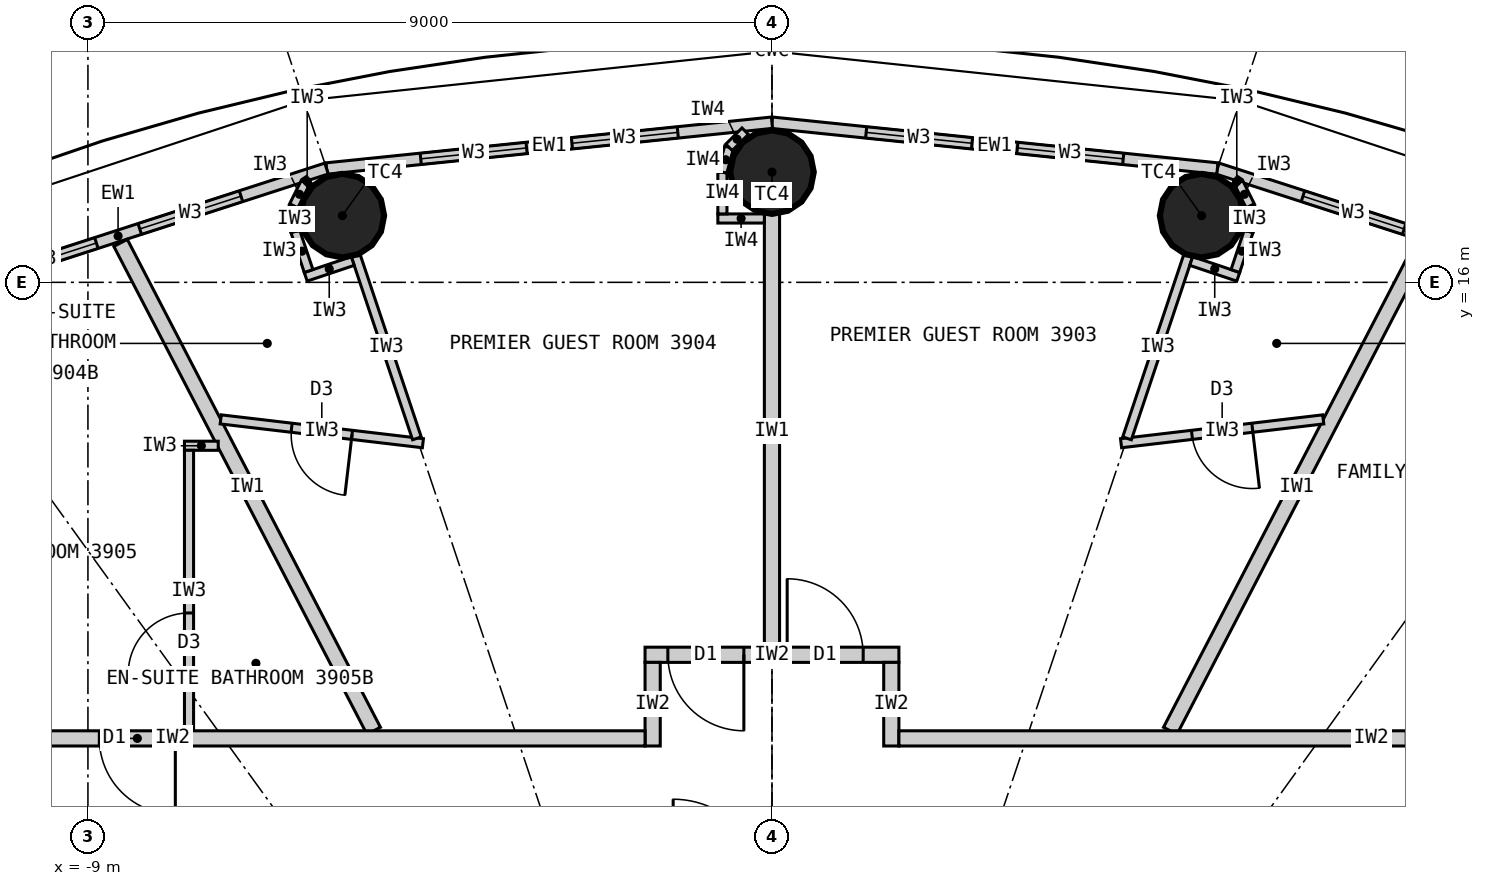
"""IFC4 building model, lengths in metres.
Left out: names, types, materials, properties, quantities, classifications, styles, units other than length and angle.
Written with IfcOpenShell. Run it as: python <this file> out.ifc"""

import sys

from ifc_helpers import new_model, si_unit, direction, frame, frame_2d, origin, origin_2d, place, context, subcontext, project, spatial, rectangle, circle, extrude, element, fill, save


model = new_model("IFC4")
c1 = context("Model", 3, precision=1e-05, world=origin(), true_north=direction((0.0, 1.0)))
c2 = subcontext(c1, "Body", "Model", "MODEL_VIEW")
j1 = project(units=[si_unit("LENGTHUNIT", "METRE"), si_unit("PLANEANGLEUNIT", "RADIAN")], contexts=[c1])
p1 = place(None, origin())
s1 = spatial("IfcSite", under=j1, at=p1, CompositionType="ELEMENT")
p2 = place(p1, origin())
s2 = spatial("IfcBuilding", under=s1, at=p2, CompositionType="ELEMENT")
p3 = place(p2, frame((0.0, 0.0, 150.0)))
s3 = spatial("IfcBuildingStorey", under=s2, at=p3, CompositionType="ELEMENT", Elevation=150.0)
for number, where, z_axis, x_axis in (
    (1, (5.653, 16.877, 0.0), (0.0, 0.0, 1.0), (1.0, 0.0, 0.0)),
    (2, (0.0, 17.45, 0.0), (0.0, 0.0, 1.0), (1.0, 0.0, 0.0)),
    (3, (-5.653, 16.877, 0.0), (0.0, 0.0, 1.0), (1.0, 0.0, 0.0)),
):
    element("IfcColumn", number, at=place(p3, frame(where, z_axis=z_axis, x_axis=x_axis)), inside=s3, PredefinedType="COLUMN", context=c2, shape_type="SweptSolid", body=[
        extrude(circle(Radius=0.55, at=origin_2d()), origin(), (0.0, 0.0, 1.0), 3.3),
    ])
p4 = place(p3, frame((11.346, 15.722, 0.0), z_axis=(0.0, 0.0, 1.0), x_axis=(-0.951432482129, 0.307857486429, 0.0)))
e4 = element("IfcWall", 4, at=p4, inside=s3, PredefinedType="ELEMENTEDWALL", context=c2, shape_type="SweptSolid", body=[
    extrude(rectangle(XDim=5.766, YDim=0.15, at=frame_2d((2.883, 0.0))), origin(), (0.0, 0.0, 1.0), 3.12),
])
p5 = place(p4, frame((1.183, 0.0, 0.9)))
e5 = element("IfcOpeningElement", 5, at=p5, cuts=e4, PredefinedType="OPENING", context=c2, shape_type="SweptSolid", body=[
    extrude(rectangle(XDim=1.4, YDim=1.9, at=frame_2d((0.7, 0.95))), frame((0.0, 0.085, 0.0), z_axis=(0.0, -1.0, 0.0), x_axis=(1.0, 0.0, 0.0)), (0.0, 0.0, 1.0), 0.17),
])
p6 = place(p4, frame((3.183, 0.0, 0.9)))
e6 = element("IfcOpeningElement", 6, at=p6, cuts=e4, PredefinedType="OPENING", context=c2, shape_type="SweptSolid", body=[
    extrude(rectangle(XDim=1.4, YDim=1.9, at=frame_2d((0.7, 0.95))), frame((0.0, 0.085, 0.0), z_axis=(0.0, -1.0, 0.0), x_axis=(1.0, 0.0, 0.0)), (0.0, 0.0, 1.0), 0.17),
])
p7 = place(p3, frame((5.86, 17.497, 0.0), z_axis=(0.0, 0.0, 1.0), x_axis=(-0.994751738032, 0.102318032045, 0.0)))
e7 = element("IfcWall", 7, at=p7, inside=s3, PredefinedType="ELEMENTEDWALL", context=c2, shape_type="SweptSolid", body=[
    extrude(rectangle(XDim=5.891, YDim=0.15, at=frame_2d((2.946, 0.0))), origin(), (0.0, 0.0, 1.0), 3.12),
])
p8 = place(p7, frame((1.246, 0.0, 0.9)))
e8 = element("IfcOpeningElement", 8, at=p8, cuts=e7, PredefinedType="OPENING", context=c2, shape_type="SweptSolid", body=[
    extrude(rectangle(XDim=1.4, YDim=1.9, at=frame_2d((0.7, 0.95))), frame((0.0, 0.085, 0.0), z_axis=(0.0, -1.0, 0.0), x_axis=(1.0, 0.0, 0.0)), (0.0, 0.0, 1.0), 0.17),
])
p9 = place(p7, frame((3.246, 0.0, 0.9)))
e9 = element("IfcOpeningElement", 9, at=p9, cuts=e7, PredefinedType="OPENING", context=c2, shape_type="SweptSolid", body=[
    extrude(rectangle(XDim=1.4, YDim=1.9, at=frame_2d((0.7, 0.95))), frame((0.0, 0.085, 0.0), z_axis=(0.0, -1.0, 0.0), x_axis=(1.0, 0.0, 0.0)), (0.0, 0.0, 1.0), 0.17),
])
p10 = place(p3, frame((0.0, 18.1, 0.0), z_axis=(0.0, 0.0, 1.0), x_axis=(-0.994751738032, -0.102318032045, 0.0)))
e10 = element("IfcWall", 10, at=p10, inside=s3, PredefinedType="ELEMENTEDWALL", context=c2, shape_type="SweptSolid", body=[
    extrude(rectangle(XDim=5.891, YDim=0.15, at=frame_2d((2.946, 0.0))), origin(), (0.0, 0.0, 1.0), 3.12),
])
p11 = place(p10, frame((1.246, 0.0, 0.9)))
e11 = element("IfcOpeningElement", 11, at=p11, cuts=e10, PredefinedType="OPENING", context=c2, shape_type="SweptSolid", body=[
    extrude(rectangle(XDim=1.4, YDim=1.9, at=frame_2d((0.7, 0.95))), frame((0.0, 0.085, 0.0), z_axis=(0.0, -1.0, 0.0), x_axis=(1.0, 0.0, 0.0)), (0.0, 0.0, 1.0), 0.17),
])
p12 = place(p10, frame((3.246, 0.0, 0.9)))
e12 = element("IfcOpeningElement", 12, at=p12, cuts=e10, PredefinedType="OPENING", context=c2, shape_type="SweptSolid", body=[
    extrude(rectangle(XDim=1.4, YDim=1.9, at=frame_2d((0.7, 0.95))), frame((0.0, 0.085, 0.0), z_axis=(0.0, -1.0, 0.0), x_axis=(1.0, 0.0, 0.0)), (0.0, 0.0, 1.0), 0.17),
])
p13 = place(p3, frame((-5.86, 17.497, 0.0), z_axis=(0.0, 0.0, 1.0), x_axis=(-0.951432482129, -0.307857486429, 0.0)))
e13 = element("IfcWall", 13, at=p13, inside=s3, PredefinedType="ELEMENTEDWALL", context=c2, shape_type="SweptSolid", body=[
    extrude(rectangle(XDim=5.766, YDim=0.15, at=frame_2d((2.883, 0.0))), origin(), (0.0, 0.0, 1.0), 3.12),
])
p14 = place(p13, frame((1.183, 0.0, 0.9)))
e14 = element("IfcOpeningElement", 14, at=p14, cuts=e13, PredefinedType="OPENING", context=c2, shape_type="SweptSolid", body=[
    extrude(rectangle(XDim=1.4, YDim=1.9, at=frame_2d((0.7, 0.95))), frame((0.0, 0.085, 0.0), z_axis=(0.0, -1.0, 0.0), x_axis=(1.0, 0.0, 0.0)), (0.0, 0.0, 1.0), 0.17),
])
p15 = place(p13, frame((3.183, 0.0, 0.9)))
e15 = element("IfcOpeningElement", 15, at=p15, cuts=e13, PredefinedType="OPENING", context=c2, shape_type="SweptSolid", body=[
    extrude(rectangle(XDim=1.4, YDim=1.9, at=frame_2d((0.7, 0.95))), frame((0.0, 0.085, 0.0), z_axis=(0.0, -1.0, 0.0), x_axis=(1.0, 0.0, 0.0)), (0.0, 0.0, 1.0), 0.17),
])
p16 = place(p3, frame((5.24, 10.1, 0.0), z_axis=(0.0, 0.0, 1.0), x_axis=(0.460532965373, 0.887642601391, 0.0)))
e16 = element("IfcWall", 16, at=p16, inside=s3, PredefinedType="PARTITIONING", context=c2, shape_type="SweptSolid", body=[
    extrude(rectangle(XDim=7.231, YDim=0.2, at=frame_2d((3.616, 0.0))), origin(), (0.0, 0.0, 1.0), 3.12),
])
p17 = place(p3, frame((0.0, 11.2, 0.0), z_axis=(0.0, 0.0, 1.0), x_axis=(0.0, 1.0, 0.0)))
e17 = element("IfcWall", 17, at=p17, inside=s3, PredefinedType="PARTITIONING", context=c2, shape_type="SweptSolid", body=[
    extrude(rectangle(XDim=5.7, YDim=0.2, at=frame_2d((2.85, 0.0))), origin(), (0.0, 0.0, 1.0), 2.42),
])
p18 = place(p3, frame((-5.24, 10.1, 0.0), z_axis=(0.0, 0.0, 1.0), x_axis=(-0.460532965373, 0.887642601391, 0.0)))
e18 = element("IfcWall", 18, at=p18, inside=s3, PredefinedType="PARTITIONING", context=c2, shape_type="SweptSolid", body=[
    extrude(rectangle(XDim=7.231, YDim=0.2, at=frame_2d((3.616, 0.0))), origin(), (0.0, 0.0, 1.0), 3.12),
])
p19 = place(p3, frame((-1.67, 11.1, 0.0), z_axis=(0.0, 0.0, 1.0), x_axis=(1.0, 0.0, 0.0)))
e19 = element("IfcWall", 19, at=p19, inside=s3, PredefinedType="PARTITIONING", context=c2, shape_type="SweptSolid", body=[
    extrude(rectangle(XDim=3.34, YDim=0.2, at=frame_2d((1.67, 0.0))), origin(), (0.0, 0.0, 1.0), 3.12),
])
p20 = place(p19, frame((1.87, 0.0, 0.0)))
e20 = element("IfcOpeningElement", 20, at=p20, cuts=e19, PredefinedType="OPENING", context=c2, shape_type="SweptSolid", body=[
    extrude(rectangle(XDim=1.0, YDim=2.2, at=frame_2d((0.5, 1.1))), frame((0.0, 0.11, 0.0), z_axis=(0.0, -1.0, 0.0), x_axis=(1.0, 0.0, 0.0)), (0.0, 0.0, 1.0), 0.22),
])
p21 = place(p19, frame((0.3, 0.0, 0.0)))
e21 = element("IfcOpeningElement", 21, at=p21, cuts=e19, PredefinedType="OPENING", context=c2, shape_type="SweptSolid", body=[
    extrude(rectangle(XDim=1.0, YDim=2.2, at=frame_2d((0.5, 1.1))), frame((0.0, 0.11, 0.0), z_axis=(0.0, -1.0, 0.0), x_axis=(1.0, 0.0, 0.0)), (0.0, 0.0, 1.0), 0.22),
])
for number, where, z_axis, x_axis in (
    (22, (-1.57, 9.9, 0.0), (0.0, 0.0, 1.0), (0.0, 1.0, 0.0)),
    (23, (1.57, 9.9, 0.0), (0.0, 0.0, 1.0), (0.0, 1.0, 0.0)),
):
    element("IfcWall", number, at=place(p3, frame(where, z_axis=z_axis, x_axis=x_axis)), inside=s3, PredefinedType="PARTITIONING", context=c2, shape_type="SweptSolid", body=[
        extrude(rectangle(XDim=1.1, YDim=0.2, at=frame_2d((0.55, 0.0))), origin(), (0.0, 0.0, 1.0), 3.12),
    ])
p22 = place(p3, frame((7.253, 14.197, 0.0), z_axis=(0.0, 0.0, 1.0), x_axis=(-0.993128188393, -0.117031625725, 0.0)))
e24 = element("IfcWall", 24, at=p22, inside=s3, PredefinedType="PARTITIONING", context=c2, shape_type="SweptSolid", body=[
    extrude(rectangle(XDim=2.678, YDim=0.12, at=frame_2d((1.339, 0.0))), origin(), (0.0, 0.0, 1.0), 3.12),
])
p23 = place(p22, frame((0.939, 0.0, 0.0)))
e25 = element("IfcOpeningElement", 25, at=p23, cuts=e24, PredefinedType="OPENING", context=c2, shape_type="SweptSolid", body=[
    extrude(rectangle(XDim=0.8, YDim=2.1, at=frame_2d((0.4, 1.05))), frame((0.0, 0.07, 0.0), z_axis=(0.0, -1.0, 0.0), x_axis=(1.0, 0.0, 0.0)), (0.0, 0.0, 1.0), 0.14),
])
p24 = place(p3, frame((4.671, 13.948, 0.0), z_axis=(0.0, 0.0, 1.0), x_axis=(0.317669167093, 0.948201613729, 0.0)))
e26 = element("IfcWall", 26, at=p24, inside=s3, PredefinedType="PARTITIONING", context=c2, shape_type="SweptSolid", body=[
    extrude(rectangle(XDim=2.54, YDim=0.12, at=frame_2d((1.27, 0.0))), origin(), (0.0, 0.0, 1.0), 2.42),
])
p25 = place(p3, frame((5.516, 16.28, 0.0), z_axis=(0.0, 0.0, 1.0), x_axis=(0.948157944392, -0.317799484717, 0.0)))
e27 = element("IfcWall", 27, at=p25, inside=s3, PredefinedType="PARTITIONING", context=c2, shape_type="SweptSolid", body=[
    extrude(rectangle(XDim=0.652, YDim=0.12, at=frame_2d((0.326, 0.0))), origin(), (0.0, 0.0, 1.0), 3.12),
])
p26 = place(p3, frame((6.097, 16.149, 0.0), z_axis=(0.0, 0.0, 1.0), x_axis=(0.317292604854, 0.948327687514, 0.0)))
e28 = element("IfcWall", 28, at=p26, inside=s3, PredefinedType="PARTITIONING", context=c2, shape_type="SweptSolid", body=[
    extrude(rectangle(XDim=0.55, YDim=0.12, at=frame_2d((0.275, 0.0))), origin(), (0.0, 0.0, 1.0), 3.12),
])
for number, where, z_axis, x_axis in (
    (29, (6.271, 16.67, 0.0), (0.0, 0.0, 1.0), (0.061, 0.998, 0.0)),
    (30, (6.292, 17.007, 0.0), (0.0, 0.0, 1.0), (-0.445, 0.895, 0.0)),
):
    element("IfcWall", number, at=place(p3, frame(where, z_axis=z_axis, x_axis=x_axis)), inside=s3, PredefinedType="PARTITIONING", context=c2, shape_type="SweptSolid", body=[
        extrude(rectangle(XDim=0.338, YDim=0.12, at=frame_2d((0.169, 0.0))), origin(), (0.0, 0.0, 1.0), 3.12),
    ])
p27 = place(p3, frame((6.142, 17.31, 0.0), z_axis=(0.0, 0.0, 1.0), x_axis=(-0.835039693181, 0.550189704386, 0.0)))
e31 = element("IfcWall", 31, at=p27, inside=s3, PredefinedType="PARTITIONING", context=c2, shape_type="SweptSolid", body=[
    extrude(rectangle(XDim=0.062, YDim=0.12, at=frame_2d((0.031, 0.0))), origin(), (0.0, 0.0, 1.0), 3.12),
])
p28 = place(p3, frame((-7.253, 14.197, 0.0), z_axis=(0.0, 0.0, 1.0), x_axis=(0.993128188393, -0.117031625725, 0.0)))
e32 = element("IfcWall", 32, at=p28, inside=s3, PredefinedType="PARTITIONING", context=c2, shape_type="SweptSolid", body=[
    extrude(rectangle(XDim=2.678, YDim=0.12, at=frame_2d((1.339, 0.0))), origin(), (0.0, 0.0, 1.0), 3.12),
])
p29 = place(p28, frame((0.939, 0.0, 0.0)))
e33 = element("IfcOpeningElement", 33, at=p29, cuts=e32, PredefinedType="OPENING", context=c2, shape_type="SweptSolid", body=[
    extrude(rectangle(XDim=0.8, YDim=2.1, at=frame_2d((0.4, 1.05))), frame((0.0, 0.07, 0.0), z_axis=(0.0, -1.0, 0.0), x_axis=(1.0, 0.0, 0.0)), (0.0, 0.0, 1.0), 0.14),
])
p30 = place(p3, frame((-4.671, 13.948, 0.0), z_axis=(0.0, 0.0, 1.0), x_axis=(-0.317669167093, 0.948201613729, 0.0)))
e34 = element("IfcWall", 34, at=p30, inside=s3, PredefinedType="PARTITIONING", context=c2, shape_type="SweptSolid", body=[
    extrude(rectangle(XDim=2.54, YDim=0.12, at=frame_2d((1.27, 0.0))), origin(), (0.0, 0.0, 1.0), 2.42),
])
p31 = place(p3, frame((-5.516, 16.28, 0.0), z_axis=(0.0, 0.0, 1.0), x_axis=(-0.948157944392, -0.317799484717, 0.0)))
e35 = element("IfcWall", 35, at=p31, inside=s3, PredefinedType="PARTITIONING", context=c2, shape_type="SweptSolid", body=[
    extrude(rectangle(XDim=0.652, YDim=0.12, at=frame_2d((0.326, 0.0))), origin(), (0.0, 0.0, 1.0), 3.12),
])
p32 = place(p3, frame((-6.097, 16.149, 0.0), z_axis=(0.0, 0.0, 1.0), x_axis=(-0.317292604854, 0.948327687514, 0.0)))
e36 = element("IfcWall", 36, at=p32, inside=s3, PredefinedType="PARTITIONING", context=c2, shape_type="SweptSolid", body=[
    extrude(rectangle(XDim=0.55, YDim=0.12, at=frame_2d((0.275, 0.0))), origin(), (0.0, 0.0, 1.0), 3.12),
])
for number, where, z_axis, x_axis in (
    (37, (-6.271, 16.67, 0.0), (0.0, 0.0, 1.0), (-0.061, 0.998, 0.0)),
    (38, (-6.292, 17.007, 0.0), (0.0, 0.0, 1.0), (0.445, 0.895, 0.0)),
):
    element("IfcWall", number, at=place(p3, frame(where, z_axis=z_axis, x_axis=x_axis)), inside=s3, PredefinedType="PARTITIONING", context=c2, shape_type="SweptSolid", body=[
        extrude(rectangle(XDim=0.338, YDim=0.12, at=frame_2d((0.169, 0.0))), origin(), (0.0, 0.0, 1.0), 3.12),
    ])
p33 = place(p3, frame((-6.142, 17.31, 0.0), z_axis=(0.0, 0.0, 1.0), x_axis=(0.835039693181, 0.550189704386, 0.0)))
e39 = element("IfcWall", 39, at=p33, inside=s3, PredefinedType="PARTITIONING", context=c2, shape_type="SweptSolid", body=[
    extrude(rectangle(XDim=0.062, YDim=0.12, at=frame_2d((0.031, 0.0))), origin(), (0.0, 0.0, 1.0), 3.12),
])
p34 = place(p3, frame((-7.286, 13.85, 0.0), z_axis=(0.0, 0.0, 1.0), x_axis=(-1.0, 0.0, 0.0)))
e40 = element("IfcWall", 40, at=p34, inside=s3, PredefinedType="PARTITIONING", context=c2, shape_type="SweptSolid", body=[
    extrude(rectangle(XDim=0.444, YDim=0.12, at=frame_2d((0.222, 0.0))), origin(), (0.0, 0.0, 1.0), 3.12),
])
p35 = place(p3, frame((-7.67, 10.1, 0.0), z_axis=(0.0, 0.0, 1.0), x_axis=(0.0, 1.0, 0.0)))
e41 = element("IfcWall", 41, at=p35, inside=s3, PredefinedType="PARTITIONING", context=c2, shape_type="SweptSolid", body=[
    extrude(rectangle(XDim=3.69, YDim=0.12, at=frame_2d((1.845, 0.0))), origin(), (0.0, 0.0, 1.0), 3.12),
])
p36 = place(p35, frame((0.75, 0.0, 0.0)))
e42 = element("IfcOpeningElement", 42, at=p36, cuts=e41, PredefinedType="OPENING", context=c2, shape_type="SweptSolid", body=[
    extrude(rectangle(XDim=0.8, YDim=2.1, at=frame_2d((0.4, 1.05))), frame((0.0, 0.07, 0.0), z_axis=(0.0, -1.0, 0.0), x_axis=(1.0, 0.0, 0.0)), (0.0, 0.0, 1.0), 0.14),
])
p37 = place(p3, frame((-14.1, 10.0, 0.0), z_axis=(0.0, 0.0, 1.0), x_axis=(1.0, 0.0, 0.0)))
e43 = element("IfcWall", 43, at=p37, inside=s3, PredefinedType="PARTITIONING", context=c2, shape_type="SweptSolid", body=[
    extrude(rectangle(XDim=12.43, YDim=0.2, at=frame_2d((6.215, 0.0))), origin(), (0.0, 0.0, 1.0), 3.12),
])
p38 = place(p37, frame((5.25, 0.0, 0.0)))
e44 = element("IfcOpeningElement", 44, at=p38, cuts=e43, PredefinedType="OPENING", context=c2, shape_type="SweptSolid", body=[
    extrude(rectangle(XDim=1.0, YDim=2.2, at=frame_2d((0.5, 1.1))), frame((0.0, 0.11, 0.0), z_axis=(0.0, -1.0, 0.0), x_axis=(1.0, 0.0, 0.0)), (0.0, 0.0, 1.0), 0.22),
])
p39 = place(p3, frame((1.67, 10.0, 0.0), z_axis=(0.0, 0.0, 1.0), x_axis=(1.0, 0.0, 0.0)))
e45 = element("IfcWall", 45, at=p39, inside=s3, PredefinedType="PARTITIONING", context=c2, shape_type="SweptSolid", body=[
    extrude(rectangle(XDim=12.43, YDim=0.2, at=frame_2d((6.215, 0.0))), origin(), (0.0, 0.0, 1.0), 3.12),
])
p40 = place(p39, frame((6.675, 0.0, 0.0)))
e46 = element("IfcOpeningElement", 46, at=p40, cuts=e45, PredefinedType="OPENING", context=c2, shape_type="SweptSolid", body=[
    extrude(rectangle(XDim=1.0, YDim=2.2, at=frame_2d((0.5, 1.1))), frame((0.0, 0.11, 0.0), z_axis=(0.0, -1.0, 0.0), x_axis=(1.0, 0.0, 0.0)), (0.0, 0.0, 1.0), 0.22),
])
p41 = place(p3, frame((-0.1, 16.84, 0.0), z_axis=(0.0, 0.0, 1.0), x_axis=(-1.0, 0.0, 0.0)))
e47 = element("IfcWall", 47, at=p41, inside=s3, PredefinedType="PARTITIONING", context=c2, shape_type="SweptSolid", body=[
    extrude(rectangle(XDim=0.612, YDim=0.12, at=frame_2d((0.306, 0.0))), origin(), (0.0, 0.0, 1.0), 3.12),
])
p42 = place(p3, frame((-0.652, 16.9, 0.0), z_axis=(0.0, 0.0, 1.0), x_axis=(0.0, 1.0, 0.0)))
e48 = element("IfcWall", 48, at=p42, inside=s3, PredefinedType="PARTITIONING", context=c2, shape_type="SweptSolid", body=[
    extrude(rectangle(XDim=0.55, YDim=0.12, at=frame_2d((0.275, 0.0))), origin(), (0.0, 0.0, 1.0), 3.12),
])
p43 = place(p3, frame((-0.652, 17.45, 0.0), z_axis=(0.0, 0.0, 1.0), x_axis=(0.258832454679, 0.965922233104, 0.0)))
e49 = element("IfcWall", 49, at=p43, inside=s3, PredefinedType="PARTITIONING", context=c2, shape_type="SweptSolid", body=[
    extrude(rectangle(XDim=0.338, YDim=0.12, at=frame_2d((0.169, 0.0))), origin(), (0.0, 0.0, 1.0), 3.12),
])
p44 = place(p3, frame((-0.565, 17.776, 0.0), z_axis=(0.0, 0.0, 1.0), x_axis=(0.707106781187, 0.707106781187, 0.0)))
e50 = element("IfcWall", 50, at=p44, inside=s3, PredefinedType="PARTITIONING", context=c2, shape_type="SweptSolid", body=[
    extrude(rectangle(XDim=0.301, YDim=0.12, at=frame_2d((0.15, 0.0))), origin(), (0.0, 0.0, 1.0), 3.12),
])
p45 = place(p6, origin())
e51 = element("IfcWindow", 51, at=p45, inside=s3, PartitioningType="SINGLE_PANEL", PredefinedType="WINDOW", context=c2, shape_type="SweptSolid", body=[
    extrude(rectangle(XDim=1.4, YDim=1.9, at=frame_2d((0.7, 0.95))), frame((0.0, 0.03, 0.0), z_axis=(0.0, -1.0, 0.0), x_axis=(1.0, 0.0, 0.0)), (0.0, 0.0, 1.0), 0.06),
])
fill(e6, e51)
p46 = place(p8, origin())
e52 = element("IfcWindow", 52, at=p46, inside=s3, PartitioningType="SINGLE_PANEL", PredefinedType="WINDOW", context=c2, shape_type="SweptSolid", body=[
    extrude(rectangle(XDim=1.4, YDim=1.9, at=frame_2d((0.7, 0.95))), frame((0.0, 0.03, 0.0), z_axis=(0.0, -1.0, 0.0), x_axis=(1.0, 0.0, 0.0)), (0.0, 0.0, 1.0), 0.06),
])
fill(e8, e52)
p47 = place(p9, origin())
e53 = element("IfcWindow", 53, at=p47, inside=s3, PartitioningType="SINGLE_PANEL", PredefinedType="WINDOW", context=c2, shape_type="SweptSolid", body=[
    extrude(rectangle(XDim=1.4, YDim=1.9, at=frame_2d((0.7, 0.95))), frame((0.0, 0.03, 0.0), z_axis=(0.0, -1.0, 0.0), x_axis=(1.0, 0.0, 0.0)), (0.0, 0.0, 1.0), 0.06),
])
fill(e9, e53)
p48 = place(p11, origin())
e54 = element("IfcWindow", 54, at=p48, inside=s3, PartitioningType="SINGLE_PANEL", PredefinedType="WINDOW", context=c2, shape_type="SweptSolid", body=[
    extrude(rectangle(XDim=1.4, YDim=1.9, at=frame_2d((0.7, 0.95))), frame((0.0, 0.03, 0.0), z_axis=(0.0, -1.0, 0.0), x_axis=(1.0, 0.0, 0.0)), (0.0, 0.0, 1.0), 0.06),
])
fill(e11, e54)
p49 = place(p12, origin())
e55 = element("IfcWindow", 55, at=p49, inside=s3, PartitioningType="SINGLE_PANEL", PredefinedType="WINDOW", context=c2, shape_type="SweptSolid", body=[
    extrude(rectangle(XDim=1.4, YDim=1.9, at=frame_2d((0.7, 0.95))), frame((0.0, 0.03, 0.0), z_axis=(0.0, -1.0, 0.0), x_axis=(1.0, 0.0, 0.0)), (0.0, 0.0, 1.0), 0.06),
])
fill(e12, e55)
p50 = place(p14, origin())
e56 = element("IfcWindow", 56, at=p50, inside=s3, PartitioningType="SINGLE_PANEL", PredefinedType="WINDOW", context=c2, shape_type="SweptSolid", body=[
    extrude(rectangle(XDim=1.4, YDim=1.9, at=frame_2d((0.7, 0.95))), frame((0.0, 0.03, 0.0), z_axis=(0.0, -1.0, 0.0), x_axis=(1.0, 0.0, 0.0)), (0.0, 0.0, 1.0), 0.06),
])
fill(e14, e56)
p51 = place(p15, origin())
e57 = element("IfcWindow", 57, at=p51, inside=s3, PartitioningType="SINGLE_PANEL", PredefinedType="WINDOW", context=c2, shape_type="SweptSolid", body=[
    extrude(rectangle(XDim=1.4, YDim=1.9, at=frame_2d((0.7, 0.95))), frame((0.0, 0.03, 0.0), z_axis=(0.0, -1.0, 0.0), x_axis=(1.0, 0.0, 0.0)), (0.0, 0.0, 1.0), 0.06),
])
fill(e15, e57)
p52 = place(p23, origin())
e58 = element("IfcDoor", 58, at=p52, inside=s3, OperationType="SINGLE_SWING_LEFT", PredefinedType="DOOR", context=c2, shape_type="SweptSolid", body=[
    extrude(rectangle(XDim=0.8, YDim=2.1, at=frame_2d((0.4, 1.05))), frame((0.0, 0.025, 0.0), z_axis=(0.0, -1.0, 0.0), x_axis=(1.0, 0.0, 0.0)), (0.0, 0.0, 1.0), 0.05),
])
fill(e25, e58)
p53 = place(p20, origin())
e59 = element("IfcDoor", 59, at=p53, inside=s3, OperationType="SINGLE_SWING_LEFT", PredefinedType="DOOR", context=c2, shape_type="SweptSolid", body=[
    extrude(rectangle(XDim=1.0, YDim=2.2, at=frame_2d((0.5, 1.1))), frame((0.0, 0.025, 0.0), z_axis=(0.0, -1.0, 0.0), x_axis=(1.0, 0.0, 0.0)), (0.0, 0.0, 1.0), 0.05),
])
fill(e20, e59)
p54 = place(p29, origin())
e60 = element("IfcDoor", 60, at=p54, inside=s3, OperationType="SINGLE_SWING_RIGHT", PredefinedType="DOOR", context=c2, shape_type="SweptSolid", body=[
    extrude(rectangle(XDim=0.8, YDim=2.1, at=frame_2d((0.4, 1.05))), frame((0.0, 0.025, 0.0), z_axis=(0.0, -1.0, 0.0), x_axis=(1.0, 0.0, 0.0)), (0.0, 0.0, 1.0), 0.05),
])
fill(e33, e60)
p55 = place(p21, origin())
e61 = element("IfcDoor", 61, at=p55, inside=s3, OperationType="SINGLE_SWING_RIGHT", PredefinedType="DOOR", context=c2, shape_type="SweptSolid", body=[
    extrude(rectangle(XDim=1.0, YDim=2.2, at=frame_2d((0.5, 1.1))), frame((0.0, 0.025, 0.0), z_axis=(0.0, -1.0, 0.0), x_axis=(1.0, 0.0, 0.0)), (0.0, 0.0, 1.0), 0.05),
])
fill(e21, e61)
p56 = place(p36, origin())
e62 = element("IfcDoor", 62, at=p56, inside=s3, OperationType="SINGLE_SWING_LEFT", PredefinedType="DOOR", context=c2, shape_type="SweptSolid", body=[
    extrude(rectangle(XDim=0.8, YDim=2.1, at=frame_2d((0.4, 1.05))), frame((0.0, 0.025, 0.0), z_axis=(0.0, -1.0, 0.0), x_axis=(1.0, 0.0, 0.0)), (0.0, 0.0, 1.0), 0.05),
])
fill(e42, e62)
p57 = place(p38, origin())
e63 = element("IfcDoor", 63, at=p57, inside=s3, OperationType="SINGLE_SWING_RIGHT", PredefinedType="DOOR", context=c2, shape_type="SweptSolid", body=[
    extrude(rectangle(XDim=1.0, YDim=2.2, at=frame_2d((0.5, 1.1))), frame((0.0, 0.025, 0.0), z_axis=(0.0, -1.0, 0.0), x_axis=(1.0, 0.0, 0.0)), (0.0, 0.0, 1.0), 0.05),
])
fill(e44, e63)
save(model, sys.argv[1])
